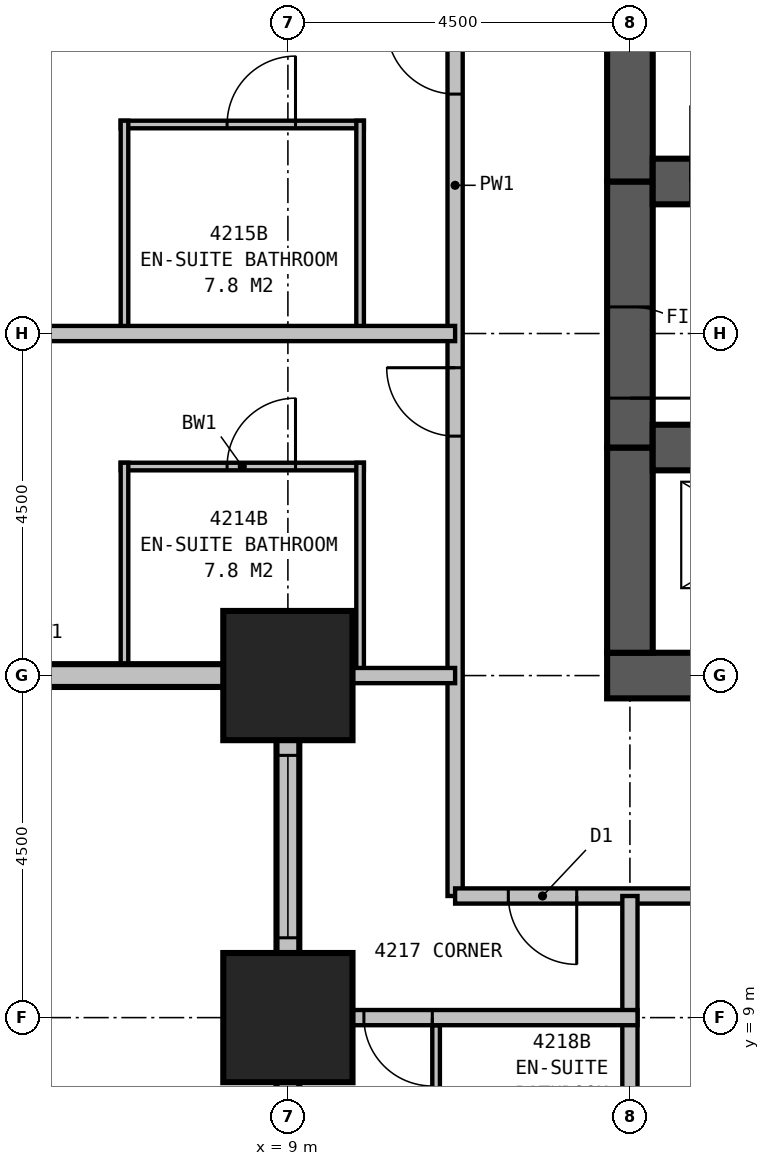
"""IFC4 building model, lengths in metres.
Left out: names, types, materials, properties, quantities, classifications, styles, units other than length and angle.
Written with IfcOpenShell. Run it as: python <this file> out.ifc"""

import sys

from ifc_helpers import new_model, si_unit, direction, frame, frame_2d, origin, origin_2d, place, context, subcontext, project, spatial, rectangle, extrude, element, fill, save


model = new_model("IFC4")
c1 = context("Model", 3, precision=1e-05, world=origin(), true_north=direction((0.0, 1.0)))
c2 = subcontext(c1, "Body", "Model", "MODEL_VIEW")
j1 = project(units=[si_unit("LENGTHUNIT", "METRE"), si_unit("PLANEANGLEUNIT", "RADIAN")], contexts=[c1])
p1 = place(None, origin())
s1 = spatial("IfcSite", under=j1, at=p1, CompositionType="ELEMENT")
p2 = place(p1, origin())
s2 = spatial("IfcBuilding", under=s1, at=p2, CompositionType="ELEMENT")
p3 = place(p2, frame((0.0, 0.0, 165.9)))
s3 = spatial("IfcBuildingStorey", under=s2, at=p3, CompositionType="ELEMENT", Elevation=165.9)
for number, where, z_axis, x_axis in (
    (1, (9.0, 13.5, 0.0), (0.0, 0.0, 1.0), (1.0, 0.0, 0.0)),
    (2, (9.0, 9.0, 0.0), (0.0, 0.0, 1.0), (1.0, 0.0, 0.0)),
):
    element("IfcColumn", number, at=place(p3, frame(where, z_axis=z_axis, x_axis=x_axis)), inside=s3, PredefinedType="COLUMN", context=c2, shape_type="SweptSolid", body=[
        extrude(rectangle(XDim=1.7, YDim=1.7, at=origin_2d()), origin(), (0.0, 0.0, 1.0), 3.5),
    ])
p4 = place(p3, frame((13.2, 13.5, 0.0), z_axis=(0.0, 0.0, 1.0), x_axis=(1.0, 0.0, 0.0)))
e3 = element("IfcWall", 3, at=p4, inside=s3, PredefinedType="SHEAR", context=c2, shape_type="SweptSolid", body=[
    extrude(rectangle(XDim=23.1, YDim=0.6, at=frame_2d((11.55, 0.0))), origin(), (0.0, 0.0, 1.0), 3.5),
])
p5 = place(p3, frame((13.8, 16.5, 0.0), z_axis=(0.0, 0.0, 1.0), x_axis=(1.0, 0.0, 0.0)))
e4 = element("IfcWall", 4, at=p5, inside=s3, PredefinedType="SHEAR", context=c2, shape_type="SweptSolid", body=[
    extrude(rectangle(XDim=21.9, YDim=0.6, at=frame_2d((10.95, 0.0))), origin(), (0.0, 0.0, 1.0), 3.5),
])
p6 = place(p5, frame((5.75, 0.0, 0.0), z_axis=(0.0, 0.0, 1.0), x_axis=(-1.0, 0.0, 0.0)))
e5 = element("IfcOpeningElement", 5, at=p6, cuts=e4, PredefinedType="OPENING", context=c2, shape_type="SweptSolid", body=[
    extrude(rectangle(XDim=1.0, YDim=2.1, at=frame_2d((0.5, 1.05))), frame((0.0, 0.31, 0.0), z_axis=(0.0, -1.0, 0.0), x_axis=(1.0, 0.0, 0.0)), (0.0, 0.0, 1.0), 0.62),
])
p7 = place(p5, frame((10.2, 0.0, 0.0), z_axis=(0.0, 0.0, 1.0), x_axis=(-1.0, 0.0, 0.0)))
e6 = element("IfcOpeningElement", 6, at=p7, cuts=e4, PredefinedType="OPENING", context=c2, shape_type="SweptSolid", body=[
    extrude(rectangle(XDim=1.0, YDim=2.1, at=frame_2d((0.5, 1.05))), frame((0.0, 0.31, 0.0), z_axis=(0.0, -1.0, 0.0), x_axis=(1.0, 0.0, 0.0)), (0.0, 0.0, 1.0), 0.62),
])
p8 = place(p5, frame((12.7, 0.0, 0.0), z_axis=(0.0, 0.0, 1.0), x_axis=(-1.0, 0.0, 0.0)))
e7 = element("IfcOpeningElement", 7, at=p8, cuts=e4, PredefinedType="OPENING", context=c2, shape_type="SweptSolid", body=[
    extrude(rectangle(XDim=1.0, YDim=2.1, at=frame_2d((0.5, 1.05))), frame((0.0, 0.31, 0.0), z_axis=(0.0, -1.0, 0.0), x_axis=(1.0, 0.0, 0.0)), (0.0, 0.0, 1.0), 0.62),
])
p9 = place(p5, frame((17.15, 0.0, 0.0), z_axis=(0.0, 0.0, 1.0), x_axis=(-1.0, 0.0, 0.0)))
e8 = element("IfcOpeningElement", 8, at=p9, cuts=e4, PredefinedType="OPENING", context=c2, shape_type="SweptSolid", body=[
    extrude(rectangle(XDim=1.0, YDim=2.1, at=frame_2d((0.5, 1.05))), frame((0.0, 0.31, 0.0), z_axis=(0.0, -1.0, 0.0), x_axis=(1.0, 0.0, 0.0)), (0.0, 0.0, 1.0), 0.62),
])
p10 = place(p5, frame((0.6, 0.0, 0.0)))
e9 = element("IfcOpeningElement", 9, at=p10, cuts=e4, PredefinedType="OPENING", context=c2, shape_type="SweptSolid", body=[
    extrude(rectangle(XDim=1.2, YDim=2.1, at=frame_2d((0.6, 1.05))), frame((0.0, 0.31, 0.0), z_axis=(0.0, -1.0, 0.0), x_axis=(1.0, 0.0, 0.0)), (0.0, 0.0, 1.0), 0.62),
])
p11 = place(p5, frame((19.6, 0.0, 0.0)))
e10 = element("IfcOpeningElement", 10, at=p11, cuts=e4, PredefinedType="OPENING", context=c2, shape_type="SweptSolid", body=[
    extrude(rectangle(XDim=1.2, YDim=2.1, at=frame_2d((0.6, 1.05))), frame((0.0, 0.31, 0.0), z_axis=(0.0, -1.0, 0.0), x_axis=(1.0, 0.0, 0.0)), (0.0, 0.0, 1.0), 0.62),
])
p12 = place(p3, frame((13.8, 20.0, 0.0), z_axis=(0.0, 0.0, 1.0), x_axis=(1.0, 0.0, 0.0)))
e11 = element("IfcWall", 11, at=p12, inside=s3, PredefinedType="SHEAR", context=c2, shape_type="SweptSolid", body=[
    extrude(rectangle(XDim=21.9, YDim=0.6, at=frame_2d((10.95, 0.0))), origin(), (0.0, 0.0, 1.0), 3.5),
])
p13 = place(p12, frame((0.5, 0.0, 0.0)))
e12 = element("IfcOpeningElement", 12, at=p13, cuts=e11, PredefinedType="OPENING", context=c2, shape_type="SweptSolid", body=[
    extrude(rectangle(XDim=1.0, YDim=2.1, at=frame_2d((0.5, 1.05))), frame((0.0, 0.31, 0.0), z_axis=(0.0, -1.0, 0.0), x_axis=(1.0, 0.0, 0.0)), (0.0, 0.0, 1.0), 0.62),
])
p14 = place(p12, frame((20.5, 0.0, 0.0)))
e13 = element("IfcOpeningElement", 13, at=p14, cuts=e11, PredefinedType="OPENING", context=c2, shape_type="SweptSolid", body=[
    extrude(rectangle(XDim=1.0, YDim=2.1, at=frame_2d((0.5, 1.05))), frame((0.0, 0.31, 0.0), z_axis=(0.0, -1.0, 0.0), x_axis=(1.0, 0.0, 0.0)), (0.0, 0.0, 1.0), 0.62),
])
p15 = place(p12, frame((9.15, 0.0, 0.0)))
e14 = element("IfcOpeningElement", 14, at=p15, cuts=e11, PredefinedType="OPENING", context=c2, shape_type="SweptSolid", body=[
    extrude(rectangle(XDim=1.1, YDim=2.1, at=frame_2d((0.55, 1.05))), frame((0.0, 0.31, 0.0), z_axis=(0.0, -1.0, 0.0), x_axis=(1.0, 0.0, 0.0)), (0.0, 0.0, 1.0), 0.62),
])
p16 = place(p12, frame((11.65, 0.0, 0.0)))
e15 = element("IfcOpeningElement", 15, at=p16, cuts=e11, PredefinedType="OPENING", context=c2, shape_type="SweptSolid", body=[
    extrude(rectangle(XDim=1.1, YDim=2.1, at=frame_2d((0.55, 1.05))), frame((0.0, 0.31, 0.0), z_axis=(0.0, -1.0, 0.0), x_axis=(1.0, 0.0, 0.0)), (0.0, 0.0, 1.0), 0.62),
])
p17 = place(p12, frame((14.15, 0.0, 0.0)))
e16 = element("IfcOpeningElement", 16, at=p17, cuts=e11, PredefinedType="OPENING", context=c2, shape_type="SweptSolid", body=[
    extrude(rectangle(XDim=1.1, YDim=2.1, at=frame_2d((0.55, 1.05))), frame((0.0, 0.31, 0.0), z_axis=(0.0, -1.0, 0.0), x_axis=(1.0, 0.0, 0.0)), (0.0, 0.0, 1.0), 0.62),
])
p18 = place(p12, frame((16.65, 0.0, 0.0)))
e17 = element("IfcOpeningElement", 17, at=p18, cuts=e11, PredefinedType="OPENING", context=c2, shape_type="SweptSolid", body=[
    extrude(rectangle(XDim=1.1, YDim=2.1, at=frame_2d((0.55, 1.05))), frame((0.0, 0.31, 0.0), z_axis=(0.0, -1.0, 0.0), x_axis=(1.0, 0.0, 0.0)), (0.0, 0.0, 1.0), 0.62),
])
p19 = place(p12, frame((4.75, 0.0, 0.0)))
e18 = element("IfcOpeningElement", 18, at=p19, cuts=e11, PredefinedType="OPENING", context=c2, shape_type="SweptSolid", body=[
    extrude(rectangle(XDim=1.0, YDim=2.1, at=frame_2d((0.5, 1.05))), frame((0.0, 0.31, 0.0), z_axis=(0.0, -1.0, 0.0), x_axis=(1.0, 0.0, 0.0)), (0.0, 0.0, 1.0), 0.62),
])
p20 = place(p12, frame((6.7, 0.0, 0.0)))
e19 = element("IfcOpeningElement", 19, at=p20, cuts=e11, PredefinedType="OPENING", context=c2, shape_type="SweptSolid", body=[
    extrude(rectangle(XDim=1.0, YDim=2.1, at=frame_2d((0.5, 1.05))), frame((0.0, 0.31, 0.0), z_axis=(0.0, -1.0, 0.0), x_axis=(1.0, 0.0, 0.0)), (0.0, 0.0, 1.0), 0.62),
])
p21 = place(p3, frame((13.5, 26.7, 0.0), z_axis=(0.0, 0.0, 1.0), x_axis=(0.0, -1.0, 0.0)))
e20 = element("IfcWall", 20, at=p21, inside=s3, PredefinedType="SHEAR", context=c2, shape_type="SweptSolid", body=[
    extrude(rectangle(XDim=6.7, YDim=0.6, at=frame_2d((3.35, 0.0))), origin(), (0.0, 0.0, 1.0), 3.5),
])
p22 = place(p3, frame((13.5, 20.0, 0.0), z_axis=(0.0, 0.0, 1.0), x_axis=(0.0, -1.0, 0.0)))
e21 = element("IfcWall", 21, at=p22, inside=s3, PredefinedType="SHEAR", context=c2, shape_type="SweptSolid", body=[
    extrude(rectangle(XDim=3.5, YDim=0.6, at=frame_2d((1.75, 0.0))), origin(), (0.0, 0.0, 1.0), 3.5),
])
p23 = place(p22, frame((1.65, 0.0, 0.0)))
e22 = element("IfcOpeningElement", 22, at=p23, cuts=e21, PredefinedType="OPENING", context=c2, shape_type="SweptSolid", body=[
    extrude(rectangle(XDim=1.2, YDim=2.1, at=frame_2d((0.6, 1.05))), frame((0.0, 0.31, 0.0), z_axis=(0.0, -1.0, 0.0), x_axis=(1.0, 0.0, 0.0)), (0.0, 0.0, 1.0), 0.62),
])
p24 = place(p3, frame((13.5, 16.5, 0.0), z_axis=(0.0, 0.0, 1.0), x_axis=(0.0, -1.0, 0.0)))
e23 = element("IfcWall", 23, at=p24, inside=s3, PredefinedType="SHEAR", context=c2, shape_type="SweptSolid", body=[
    extrude(rectangle(XDim=2.7, YDim=0.6, at=frame_2d((1.35, 0.0))), origin(), (0.0, 0.0, 1.0), 3.5),
])
p25 = place(p3, frame((1.35, 13.5, 0.0), z_axis=(0.0, 0.0, 1.0), x_axis=(1.0, 0.0, 0.0)))
e24 = element("IfcWall", 24, at=p25, inside=s3, PredefinedType="STANDARD", context=c2, shape_type="SweptSolid", body=[
    extrude(rectangle(XDim=7.8, YDim=0.3, at=frame_2d((3.9, 0.0))), origin(), (0.0, 0.0, 1.0), 2.15),
])
p26 = place(p25, frame((1.2, 0.0, 0.5)))
e25 = element("IfcOpeningElement", 25, at=p26, cuts=e24, PredefinedType="OPENING", context=c2, shape_type="SweptSolid", body=[
    extrude(rectangle(XDim=0.9, YDim=1.5, at=frame_2d((0.45, 0.75))), frame((0.0, 0.16, 0.0), z_axis=(0.0, -1.0, 0.0), x_axis=(1.0, 0.0, 0.0)), (0.0, 0.0, 1.0), 0.32),
])
p27 = place(p3, frame((9.0, 13.65, 0.0), z_axis=(0.0, 0.0, 1.0), x_axis=(0.0, -1.0, 0.0)))
e26 = element("IfcWall", 26, at=p27, inside=s3, PredefinedType="STANDARD", context=c2, shape_type="SweptSolid", body=[
    extrude(rectangle(XDim=13.8, YDim=0.3, at=frame_2d((6.9, 0.0))), origin(), (0.0, 0.0, 1.0), 2.15),
])
p28 = place(p27, frame((1.2, 0.0, 0.5)))
e27 = element("IfcOpeningElement", 27, at=p28, cuts=e26, PredefinedType="OPENING", context=c2, shape_type="SweptSolid", body=[
    extrude(rectangle(XDim=2.4, YDim=1.5, at=frame_2d((1.2, 0.75))), frame((0.0, 0.16, 0.0), z_axis=(0.0, -1.0, 0.0), x_axis=(1.0, 0.0, 0.0)), (0.0, 0.0, 1.0), 0.32),
])
p29 = place(p27, frame((5.7, 0.0, 0.5)))
e28 = element("IfcOpeningElement", 28, at=p29, cuts=e26, PredefinedType="OPENING", context=c2, shape_type="SweptSolid", body=[
    extrude(rectangle(XDim=2.4, YDim=1.5, at=frame_2d((1.2, 0.75))), frame((0.0, 0.16, 0.0), z_axis=(0.0, -1.0, 0.0), x_axis=(1.0, 0.0, 0.0)), (0.0, 0.0, 1.0), 0.32),
])
p30 = place(p27, frame((10.2, 0.0, 0.5)))
e29 = element("IfcOpeningElement", 29, at=p30, cuts=e26, PredefinedType="OPENING", context=c2, shape_type="SweptSolid", body=[
    extrude(rectangle(XDim=2.4, YDim=1.5, at=frame_2d((1.2, 0.75))), frame((0.0, 0.16, 0.0), z_axis=(0.0, -1.0, 0.0), x_axis=(1.0, 0.0, 0.0)), (0.0, 0.0, 1.0), 0.32),
])
p31 = place(p3, frame((11.2, 10.6, 0.0), z_axis=(0.0, 0.0, 1.0), x_axis=(1.0, 0.0, 0.0)))
e30 = element("IfcWall", 30, at=p31, inside=s3, PredefinedType="PARTITIONING", context=c2, shape_type="SweptSolid", body=[
    extrude(rectangle(XDim=27.1, YDim=0.2, at=frame_2d((13.55, 0.0))), origin(), (0.0, 0.0, 1.0), 3.25),
])
p32 = place(p31, frame((4.05, 0.0, 0.0), z_axis=(0.0, 0.0, 1.0), x_axis=(-1.0, 0.0, 0.0)))
e31 = element("IfcOpeningElement", 31, at=p32, cuts=e30, PredefinedType="OPENING", context=c2, shape_type="SweptSolid", body=[
    extrude(rectangle(XDim=0.9, YDim=2.1, at=frame_2d((0.45, 1.05))), frame((0.0, 0.11, 0.0), z_axis=(0.0, -1.0, 0.0), x_axis=(1.0, 0.0, 0.0)), (0.0, 0.0, 1.0), 0.22),
])
p33 = place(p31, frame((12.65, 0.0, 0.0), z_axis=(0.0, 0.0, 1.0), x_axis=(-1.0, 0.0, 0.0)))
e32 = element("IfcOpeningElement", 32, at=p33, cuts=e30, PredefinedType="OPENING", context=c2, shape_type="SweptSolid", body=[
    extrude(rectangle(XDim=1.0, YDim=2.1, at=frame_2d((0.5, 1.05))), frame((0.0, 0.11, 0.0), z_axis=(0.0, -1.0, 0.0), x_axis=(1.0, 0.0, 0.0)), (0.0, 0.0, 1.0), 0.22),
])
p34 = place(p31, frame((17.55, 0.0, 0.0), z_axis=(0.0, 0.0, 1.0), x_axis=(-1.0, 0.0, 0.0)))
e33 = element("IfcOpeningElement", 33, at=p34, cuts=e30, PredefinedType="OPENING", context=c2, shape_type="SweptSolid", body=[
    extrude(rectangle(XDim=0.9, YDim=2.1, at=frame_2d((0.45, 1.05))), frame((0.0, 0.11, 0.0), z_axis=(0.0, -1.0, 0.0), x_axis=(1.0, 0.0, 0.0)), (0.0, 0.0, 1.0), 0.22),
])
p35 = place(p31, frame((1.6, 0.0, 0.0), z_axis=(0.0, 0.0, 1.0), x_axis=(-1.0, 0.0, 0.0)))
e34 = element("IfcOpeningElement", 34, at=p35, cuts=e30, PredefinedType="OPENING", context=c2, shape_type="SweptSolid", body=[
    extrude(rectangle(XDim=0.9, YDim=2.1, at=frame_2d((0.45, 1.05))), frame((0.0, 0.11, 0.0), z_axis=(0.0, -1.0, 0.0), x_axis=(1.0, 0.0, 0.0)), (0.0, 0.0, 1.0), 0.22),
])
p36 = place(p31, frame((26.4, 0.0, 0.0), z_axis=(0.0, 0.0, 1.0), x_axis=(-1.0, 0.0, 0.0)))
e35 = element("IfcOpeningElement", 35, at=p36, cuts=e30, PredefinedType="OPENING", context=c2, shape_type="SweptSolid", body=[
    extrude(rectangle(XDim=0.9, YDim=2.1, at=frame_2d((0.45, 1.05))), frame((0.0, 0.11, 0.0), z_axis=(0.0, -1.0, 0.0), x_axis=(1.0, 0.0, 0.0)), (0.0, 0.0, 1.0), 0.22),
])
p37 = place(p3, frame((11.2, 10.6, 0.0), z_axis=(0.0, 0.0, 1.0), x_axis=(0.0, 1.0, 0.0)))
e36 = element("IfcWall", 36, at=p37, inside=s3, PredefinedType="PARTITIONING", context=c2, shape_type="SweptSolid", body=[
    extrude(rectangle(XDim=18.7, YDim=0.2, at=frame_2d((9.35, 0.0))), origin(), (0.0, 0.0, 1.0), 3.25),
])
p38 = place(p37, frame((6.05, 0.0, 0.0)))
e37 = element("IfcOpeningElement", 37, at=p38, cuts=e36, PredefinedType="OPENING", context=c2, shape_type="SweptSolid", body=[
    extrude(rectangle(XDim=0.9, YDim=2.1, at=frame_2d((0.45, 1.05))), frame((0.0, 0.11, 0.0), z_axis=(0.0, -1.0, 0.0), x_axis=(1.0, 0.0, 0.0)), (0.0, 0.0, 1.0), 0.22),
])
p39 = place(p37, frame((10.55, 0.0, 0.0)))
e38 = element("IfcOpeningElement", 38, at=p39, cuts=e36, PredefinedType="OPENING", context=c2, shape_type="SweptSolid", body=[
    extrude(rectangle(XDim=0.9, YDim=2.1, at=frame_2d((0.45, 1.05))), frame((0.0, 0.11, 0.0), z_axis=(0.0, -1.0, 0.0), x_axis=(1.0, 0.0, 0.0)), (0.0, 0.0, 1.0), 0.22),
])
p40 = place(p37, frame((14.65, 0.0, 0.0)))
e39 = element("IfcOpeningElement", 39, at=p40, cuts=e36, PredefinedType="OPENING", context=c2, shape_type="SweptSolid", body=[
    extrude(rectangle(XDim=1.0, YDim=2.1, at=frame_2d((0.5, 1.05))), frame((0.0, 0.11, 0.0), z_axis=(0.0, -1.0, 0.0), x_axis=(1.0, 0.0, 0.0)), (0.0, 0.0, 1.0), 0.22),
])
p41 = place(p3, frame((11.2, 18.0, 0.0), z_axis=(0.0, 0.0, 1.0), x_axis=(-1.0, 0.0, 0.0)))
e40 = element("IfcWall", 40, at=p41, inside=s3, PredefinedType="PARTITIONING", context=c2, shape_type="SweptSolid", body=[
    extrude(rectangle(XDim=9.199, YDim=0.2, at=frame_2d((4.6, 0.0))), origin(), (0.0, 0.0, 1.0), 2.25),
])
for number, where, z_axis, x_axis in (
    (41, (9.95, 13.5, 0.0), (0.0, 0.0, 1.0), (0.0, 1.0, 0.0)),
    (42, (6.85, 13.5, 0.0), (0.0, 0.0, 1.0), (0.0, 1.0, 0.0)),
):
    element("IfcWall", number, at=place(p3, frame(where, z_axis=z_axis, x_axis=x_axis)), inside=s3, PredefinedType="PLUMBINGWALL", context=c2, shape_type="SweptSolid", body=[
        extrude(rectangle(XDim=2.8, YDim=0.1, at=frame_2d((1.4, 0.0))), origin(), (0.0, 0.0, 1.0), 3.25),
    ])
p42 = place(p3, frame((10.0, 16.25, 0.0), z_axis=(0.0, 0.0, 1.0), x_axis=(-1.0, 0.0, 0.0)))
e43 = element("IfcWall", 43, at=p42, inside=s3, PredefinedType="PLUMBINGWALL", context=c2, shape_type="SweptSolid", body=[
    extrude(rectangle(XDim=3.2, YDim=0.1, at=frame_2d((1.6, 0.0))), origin(), (0.0, 0.0, 1.0), 3.25),
])
p43 = place(p42, frame((1.8, 0.0, 0.0), z_axis=(0.0, 0.0, 1.0), x_axis=(-1.0, 0.0, 0.0)))
e44 = element("IfcOpeningElement", 44, at=p43, cuts=e43, PredefinedType="OPENING", context=c2, shape_type="SweptSolid", body=[
    extrude(rectangle(XDim=0.9, YDim=2.1, at=frame_2d((0.45, 1.05))), frame((0.0, 0.06, 0.0), z_axis=(0.0, -1.0, 0.0), x_axis=(1.0, 0.0, 0.0)), (0.0, 0.0, 1.0), 0.12),
])
for number, where, z_axis, x_axis in (
    (45, (9.95, 18.0, 0.0), (0.0, 0.0, 1.0), (0.0, 1.0, 0.0)),
    (46, (6.85, 18.0, 0.0), (0.0, 0.0, 1.0), (0.0, 1.0, 0.0)),
):
    element("IfcWall", number, at=place(p3, frame(where, z_axis=z_axis, x_axis=x_axis)), inside=s3, PredefinedType="PLUMBINGWALL", context=c2, shape_type="SweptSolid", body=[
        extrude(rectangle(XDim=2.8, YDim=0.1, at=frame_2d((1.4, 0.0))), origin(), (0.0, 0.0, 1.0), 3.25),
    ])
p44 = place(p3, frame((10.0, 20.75, 0.0), z_axis=(0.0, 0.0, 1.0), x_axis=(-1.0, 0.0, 0.0)))
e47 = element("IfcWall", 47, at=p44, inside=s3, PredefinedType="PLUMBINGWALL", context=c2, shape_type="SweptSolid", body=[
    extrude(rectangle(XDim=3.2, YDim=0.1, at=frame_2d((1.6, 0.0))), origin(), (0.0, 0.0, 1.0), 3.25),
])
p45 = place(p44, frame((1.8, 0.0, 0.0), z_axis=(0.0, 0.0, 1.0), x_axis=(-1.0, 0.0, 0.0)))
e48 = element("IfcOpeningElement", 48, at=p45, cuts=e47, PredefinedType="OPENING", context=c2, shape_type="SweptSolid", body=[
    extrude(rectangle(XDim=0.9, YDim=2.1, at=frame_2d((0.45, 1.05))), frame((0.0, 0.06, 0.0), z_axis=(0.0, -1.0, 0.0), x_axis=(1.0, 0.0, 0.0)), (0.0, 0.0, 1.0), 0.12),
])
p46 = place(p3, frame((11.2, 13.5, 0.0), z_axis=(0.0, 0.0, 1.0), x_axis=(-1.0, 0.0, 0.0)))
e49 = element("IfcWall", 49, at=p46, inside=s3, PredefinedType="PARTITIONING", context=c2, shape_type="SweptSolid", body=[
    extrude(rectangle(XDim=2.2, YDim=0.2, at=frame_2d((1.1, 0.0))), origin(), (0.0, 0.0, 1.0), 1.95),
])
p47 = place(p3, frame((13.5, 10.6, 0.0), z_axis=(0.0, 0.0, 1.0), x_axis=(0.0, -1.0, 0.0)))
e50 = element("IfcWall", 50, at=p47, inside=s3, PredefinedType="PARTITIONING", context=c2, shape_type="SweptSolid", body=[
    extrude(rectangle(XDim=10.6, YDim=0.2, at=frame_2d((5.3, 0.0))), origin(), (0.0, 0.0, 1.0), 2.25),
])
p48 = place(p3, frame((13.6, 9.0, 0.0), z_axis=(0.0, 0.0, 1.0), x_axis=(-1.0, 0.0, 0.0)))
e51 = element("IfcWall", 51, at=p48, inside=s3, PredefinedType="PARTITIONING", context=c2, shape_type="SweptSolid", body=[
    extrude(rectangle(XDim=4.6, YDim=0.2, at=frame_2d((2.3, 0.0))), origin(), (0.0, 0.0, 1.0), 3.25),
])
p49 = place(p48, frame((2.7, 0.0, 0.0)))
e52 = element("IfcOpeningElement", 52, at=p49, cuts=e51, PredefinedType="OPENING", context=c2, shape_type="SweptSolid", body=[
    extrude(rectangle(XDim=0.9, YDim=2.1, at=frame_2d((0.45, 1.05))), frame((0.0, 0.11, 0.0), z_axis=(0.0, -1.0, 0.0), x_axis=(1.0, 0.0, 0.0)), (0.0, 0.0, 1.0), 0.22),
])
p50 = place(p3, frame((10.95, 8.9, 0.0), z_axis=(0.0, 0.0, 1.0), x_axis=(0.0, -1.0, 0.0)))
e53 = element("IfcWall", 53, at=p50, inside=s3, PredefinedType="PLUMBINGWALL", context=c2, shape_type="SweptSolid", body=[
    extrude(rectangle(XDim=2.3, YDim=0.1, at=frame_2d((1.15, 0.0))), origin(), (0.0, 0.0, 1.0), 3.25),
])
p51 = place(p28, origin())
e54 = element("IfcWindow", 54, at=p51, inside=s3, PartitioningType="SINGLE_PANEL", PredefinedType="WINDOW", context=c2, shape_type="SweptSolid", body=[
    extrude(rectangle(XDim=2.4, YDim=1.5, at=frame_2d((1.2, 0.75))), frame((0.0, 0.03, 0.0), z_axis=(0.0, -1.0, 0.0), x_axis=(1.0, 0.0, 0.0)), (0.0, 0.0, 1.0), 0.06),
])
fill(e27, e54)
p52 = place(p35, origin())
e55 = element("IfcDoor", 55, at=p52, inside=s3, OperationType="SINGLE_SWING_LEFT", PredefinedType="DOOR", context=c2, shape_type="SweptSolid", body=[
    extrude(rectangle(XDim=0.9, YDim=2.1, at=frame_2d((0.45, 1.05))), frame((0.0, 0.025, 0.0), z_axis=(0.0, -1.0, 0.0), x_axis=(1.0, 0.0, 0.0)), (0.0, 0.0, 1.0), 0.05),
])
fill(e34, e55)
p53 = place(p38, origin())
e56 = element("IfcDoor", 56, at=p53, inside=s3, OperationType="SINGLE_SWING_RIGHT", PredefinedType="DOOR", context=c2, shape_type="SweptSolid", body=[
    extrude(rectangle(XDim=0.9, YDim=2.1, at=frame_2d((0.45, 1.05))), frame((0.0, 0.025, 0.0), z_axis=(0.0, -1.0, 0.0), x_axis=(1.0, 0.0, 0.0)), (0.0, 0.0, 1.0), 0.05),
])
fill(e37, e56)
p54 = place(p39, origin())
e57 = element("IfcDoor", 57, at=p54, inside=s3, OperationType="SINGLE_SWING_RIGHT", PredefinedType="DOOR", context=c2, shape_type="SweptSolid", body=[
    extrude(rectangle(XDim=0.9, YDim=2.1, at=frame_2d((0.45, 1.05))), frame((0.0, 0.025, 0.0), z_axis=(0.0, -1.0, 0.0), x_axis=(1.0, 0.0, 0.0)), (0.0, 0.0, 1.0), 0.05),
])
fill(e38, e57)
p55 = place(p43, origin())
e58 = element("IfcDoor", 58, at=p55, inside=s3, OperationType="SINGLE_SWING_RIGHT", PredefinedType="DOOR", context=c2, shape_type="SweptSolid", body=[
    extrude(rectangle(XDim=0.9, YDim=2.1, at=frame_2d((0.45, 1.05))), frame((0.0, 0.025, 0.0), z_axis=(0.0, -1.0, 0.0), x_axis=(1.0, 0.0, 0.0)), (0.0, 0.0, 1.0), 0.05),
])
fill(e44, e58)
p56 = place(p45, origin())
e59 = element("IfcDoor", 59, at=p56, inside=s3, OperationType="SINGLE_SWING_RIGHT", PredefinedType="DOOR", context=c2, shape_type="SweptSolid", body=[
    extrude(rectangle(XDim=0.9, YDim=2.1, at=frame_2d((0.45, 1.05))), frame((0.0, 0.025, 0.0), z_axis=(0.0, -1.0, 0.0), x_axis=(1.0, 0.0, 0.0)), (0.0, 0.0, 1.0), 0.05),
])
fill(e48, e59)
p57 = place(p49, origin())
e60 = element("IfcDoor", 60, at=p57, inside=s3, OperationType="SINGLE_SWING_LEFT", PredefinedType="DOOR", context=c2, shape_type="SweptSolid", body=[
    extrude(rectangle(XDim=0.9, YDim=2.1, at=frame_2d((0.45, 1.05))), frame((0.0, 0.025, 0.0), z_axis=(0.0, -1.0, 0.0), x_axis=(1.0, 0.0, 0.0)), (0.0, 0.0, 1.0), 0.05),
])
fill(e52, e60)
p58 = place(p23, origin())
e61 = element("IfcDoor", 61, at=p58, inside=s3, OperationType="SINGLE_SWING_RIGHT", PredefinedType="DOOR", context=c2, shape_type="SweptSolid", body=[
    extrude(rectangle(XDim=1.2, YDim=2.1, at=frame_2d((0.6, 1.05))), frame((0.0, 0.3, 0.0), z_axis=(0.0, -1.0, 0.0), x_axis=(1.0, 0.0, 0.0)), (0.0, 0.0, 1.0), 0.6),
])
fill(e22, e61)
save(model, sys.argv[1])
